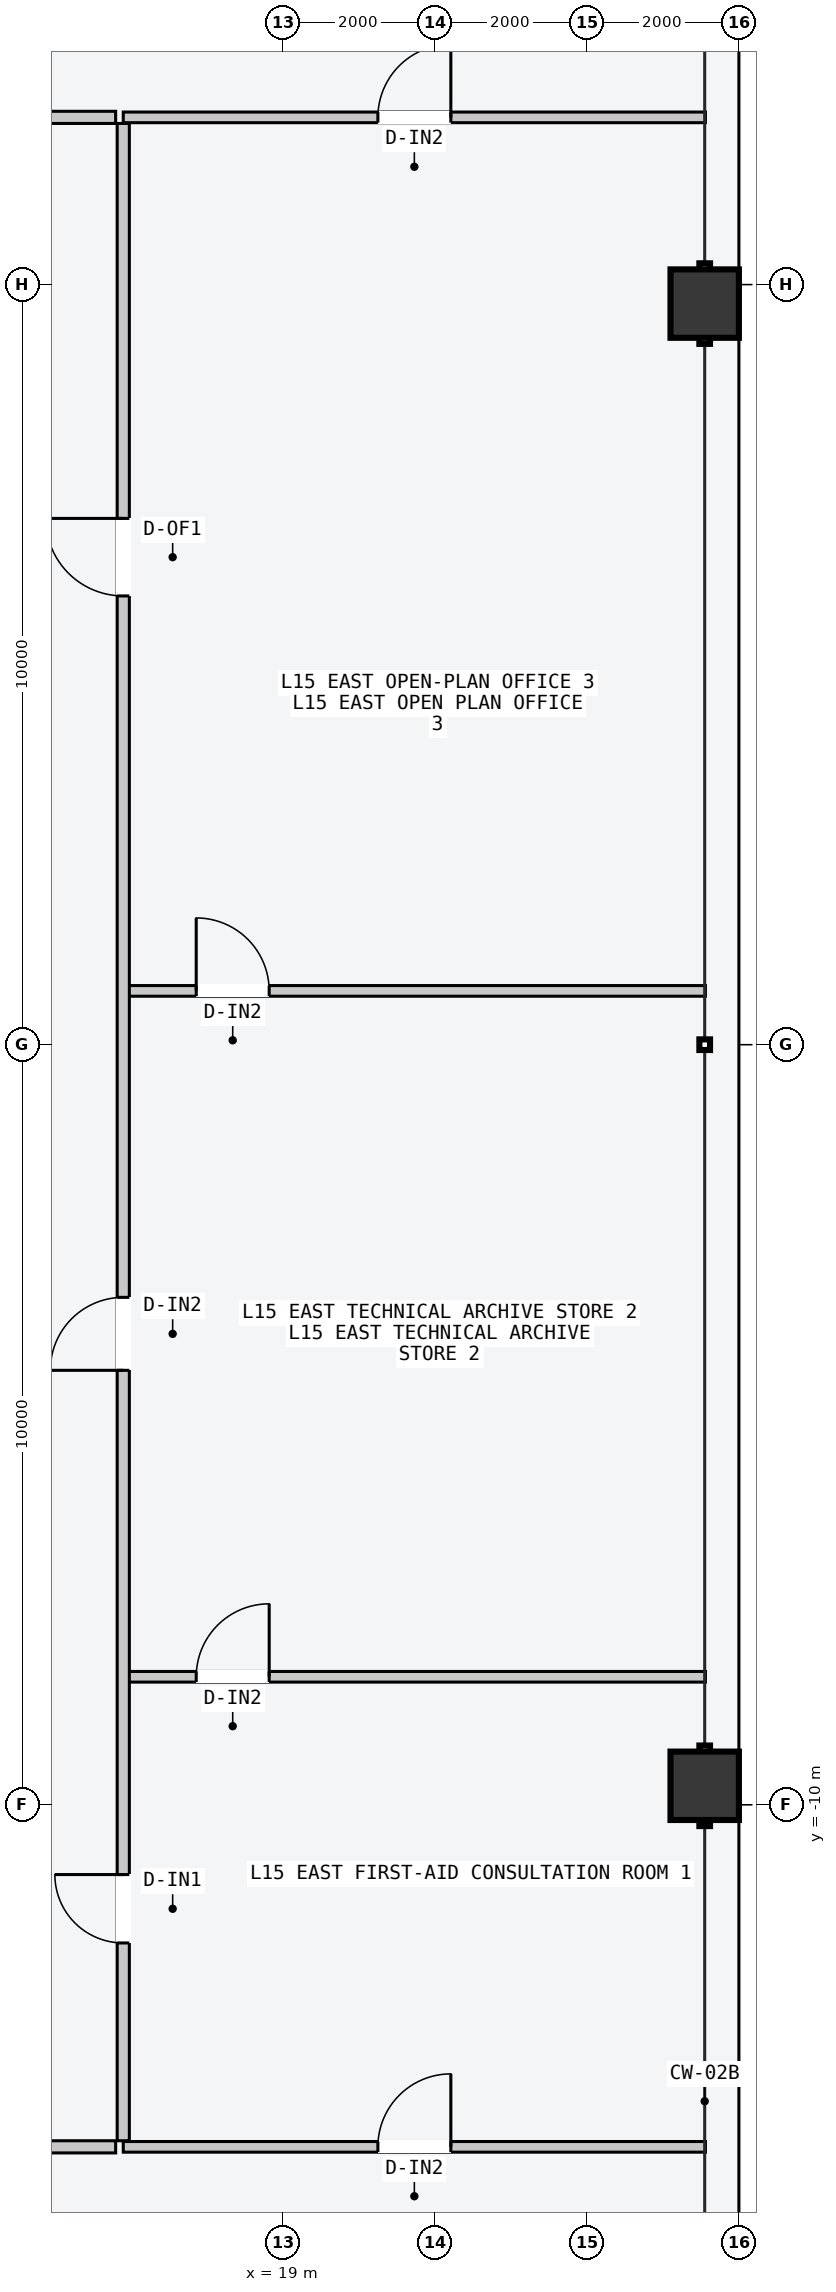
"""IFC4 building model, lengths in metres.
Left out: names, types, materials, properties, quantities, classifications, styles, units other than length and angle.
Written with IfcOpenShell. Run it as: python <this file> out.ifc"""

import sys

from ifc_helpers import new_model, si_unit, direction, frame, frame_2d, origin, origin_2d, place, context, subcontext, project, spatial, rectangle, hollow_rectangle, extrude, element, fill, save


model = new_model("IFC4")
c1 = context("Model", 3, precision=1e-05, world=origin(), true_north=direction((0.0, 1.0)))
c2 = subcontext(c1, "Body", "Model", "MODEL_VIEW")
j1 = project(units=[si_unit("LENGTHUNIT", "METRE"), si_unit("PLANEANGLEUNIT", "RADIAN")], contexts=[c1])
p1 = place(None, origin())
s1 = spatial("IfcSite", under=j1, at=p1, CompositionType="ELEMENT")
p2 = place(p1, origin())
s2 = spatial("IfcBuilding", under=s1, at=p2, CompositionType="ELEMENT")
p3 = place(p2, frame((0.0, 0.0, 60.0)))
s3 = spatial("IfcBuildingStorey", under=s2, at=p3, CompositionType="ELEMENT", Elevation=60.0)
for number, where, z_axis, x_axis in (
    (1, (24.55, -9.75, 0.0), (0.0, 0.0, 1.0), (0.0, 1.0, 0.0)),
    (2, (24.55, 9.75, 0.0), (0.0, 0.0, 1.0), (0.0, 1.0, 0.0)),
):
    element("IfcColumn", number, at=place(p3, frame(where, z_axis=z_axis, x_axis=x_axis)), inside=s3, PredefinedType="COLUMN", context=c2, shape_type="SweptSolid", body=[
        extrude(hollow_rectangle(XDim=0.9, YDim=0.9, WallThickness=0.045, at=origin_2d()), origin(), (0.0, 0.0, 1.0), 3.6),
    ])
p4 = place(p3, frame((-16.8, 12.2, 0.0), z_axis=(0.0, 0.0, 1.0), x_axis=(1.0, 0.0, 0.0)))
e3 = element("IfcWall", 3, at=p4, inside=s3, PredefinedType="PARTITIONING", context=c2, shape_type="SweptSolid", body=[
    extrude(rectangle(XDim=33.6, YDim=0.16, at=frame_2d((16.8, 0.0))), origin(), (0.0, 0.0, 1.0), 3.4),
])
p5 = place(p4, frame((16.1, 0.0, 0.0)))
e4 = element("IfcOpeningElement", 4, at=p5, cuts=e3, PredefinedType="OPENING", context=c2, shape_type="SweptSolid", body=[
    extrude(rectangle(XDim=1.4, YDim=2.2, at=frame_2d((0.7, 1.1))), frame((0.0, 0.09, 0.0), z_axis=(0.0, -1.0, 0.0), x_axis=(1.0, 0.0, 0.0)), (0.0, 0.0, 1.0), 0.18),
])
p6 = place(p3, frame((16.9, 12.2, 0.0), z_axis=(0.0, 0.0, 1.0), x_axis=(1.0, 0.0, 0.0)))
e5 = element("IfcWall", 5, at=p6, inside=s3, PredefinedType="PARTITIONING", context=c2, shape_type="SweptSolid", body=[
    extrude(rectangle(XDim=7.66, YDim=0.14, at=frame_2d((3.83, 0.0))), origin(), (0.0, 0.0, 1.0), 3.4),
])
p7 = place(p6, frame((3.35, 0.0, 0.0)))
e6 = element("IfcOpeningElement", 6, at=p7, cuts=e5, PredefinedType="OPENING", context=c2, shape_type="SweptSolid", body=[
    extrude(rectangle(XDim=0.96, YDim=2.18, at=frame_2d((0.48, 1.09))), frame((0.0, 0.08, 0.0), z_axis=(0.0, -1.0, 0.0), x_axis=(1.0, 0.0, 0.0)), (0.0, 0.0, 1.0), 0.16),
])
p8 = place(p3, frame((-16.8, -14.5, 0.0), z_axis=(0.0, 0.0, 1.0), x_axis=(1.0, 0.0, 0.0)))
e7 = element("IfcWall", 7, at=p8, inside=s3, PredefinedType="PARTITIONING", context=c2, shape_type="SweptSolid", body=[
    extrude(rectangle(XDim=33.6, YDim=0.16, at=frame_2d((16.8, 0.0))), origin(), (0.0, 0.0, 1.0), 3.4),
])
p9 = place(p8, frame((4.107, 0.0, 0.0)))
e8 = element("IfcOpeningElement", 8, at=p9, cuts=e7, PredefinedType="OPENING", context=c2, shape_type="SweptSolid", body=[
    extrude(rectangle(XDim=1.02, YDim=2.2, at=frame_2d((0.51, 1.1))), frame((0.0, 0.09, 0.0), z_axis=(0.0, -1.0, 0.0), x_axis=(1.0, 0.0, 0.0)), (0.0, 0.0, 1.0), 0.18),
])
p10 = place(p8, frame((13.881, 0.0, 0.0)))
e9 = element("IfcOpeningElement", 9, at=p10, cuts=e7, PredefinedType="OPENING", context=c2, shape_type="SweptSolid", body=[
    extrude(rectangle(XDim=1.06, YDim=2.2, at=frame_2d((0.53, 1.1))), frame((0.0, 0.09, 0.0), z_axis=(0.0, -1.0, 0.0), x_axis=(1.0, 0.0, 0.0)), (0.0, 0.0, 1.0), 0.18),
])
p11 = place(p8, frame((23.547, 0.0, 0.0)))
e10 = element("IfcOpeningElement", 10, at=p11, cuts=e7, PredefinedType="OPENING", context=c2, shape_type="SweptSolid", body=[
    extrude(rectangle(XDim=1.24, YDim=2.24, at=frame_2d((0.62, 1.12))), frame((0.0, 0.09, 0.0), z_axis=(0.0, -1.0, 0.0), x_axis=(1.0, 0.0, 0.0)), (0.0, 0.0, 1.0), 0.18),
])
p12 = place(p8, frame((30.473, 0.0, 0.0)))
e11 = element("IfcOpeningElement", 11, at=p12, cuts=e7, PredefinedType="OPENING", context=c2, shape_type="SweptSolid", body=[
    extrude(rectangle(XDim=1.4, YDim=2.2, at=frame_2d((0.7, 1.1))), frame((0.0, 0.09, 0.0), z_axis=(0.0, -1.0, 0.0), x_axis=(1.0, 0.0, 0.0)), (0.0, 0.0, 1.0), 0.18),
])
p13 = place(p3, frame((16.9, -14.5, 0.0), z_axis=(0.0, 0.0, 1.0), x_axis=(1.0, 0.0, 0.0)))
e12 = element("IfcWall", 12, at=p13, inside=s3, PredefinedType="PARTITIONING", context=c2, shape_type="SweptSolid", body=[
    extrude(rectangle(XDim=7.66, YDim=0.14, at=frame_2d((3.83, 0.0))), origin(), (0.0, 0.0, 1.0), 3.4),
])
p14 = place(p13, frame((3.35, 0.0, 0.0)))
e13 = element("IfcOpeningElement", 13, at=p14, cuts=e12, PredefinedType="OPENING", context=c2, shape_type="SweptSolid", body=[
    extrude(rectangle(XDim=0.96, YDim=2.18, at=frame_2d((0.48, 1.09))), frame((0.0, 0.08, 0.0), z_axis=(0.0, -1.0, 0.0), x_axis=(1.0, 0.0, 0.0)), (0.0, 0.0, 1.0), 0.16),
])
p15 = place(p3, frame((16.96, -8.316, 0.0), z_axis=(0.0, 0.0, 1.0), x_axis=(1.0, 0.0, 0.0)))
e14 = element("IfcWall", 14, at=p15, inside=s3, PredefinedType="PARTITIONING", context=c2, shape_type="SweptSolid", body=[
    extrude(rectangle(XDim=7.6, YDim=0.14, at=frame_2d((3.8, 0.0))), origin(), (0.0, 0.0, 1.0), 3.4),
])
p16 = place(p15, frame((0.9, 0.0, 0.0)))
e15 = element("IfcOpeningElement", 15, at=p16, cuts=e14, PredefinedType="OPENING", context=c2, shape_type="SweptSolid", body=[
    extrude(rectangle(XDim=0.96, YDim=2.18, at=frame_2d((0.48, 1.09))), frame((0.0, 0.08, 0.0), z_axis=(0.0, -1.0, 0.0), x_axis=(1.0, 0.0, 0.0)), (0.0, 0.0, 1.0), 0.16),
])
p17 = place(p3, frame((16.96, 0.708, 0.0), z_axis=(0.0, 0.0, 1.0), x_axis=(1.0, 0.0, 0.0)))
e16 = element("IfcWall", 16, at=p17, inside=s3, PredefinedType="PARTITIONING", context=c2, shape_type="SweptSolid", body=[
    extrude(rectangle(XDim=7.6, YDim=0.14, at=frame_2d((3.8, 0.0))), origin(), (0.0, 0.0, 1.0), 3.4),
])
p18 = place(p17, frame((0.9, 0.0, 0.0)))
e17 = element("IfcOpeningElement", 17, at=p18, cuts=e16, PredefinedType="OPENING", context=c2, shape_type="SweptSolid", body=[
    extrude(rectangle(XDim=0.96, YDim=2.18, at=frame_2d((0.48, 1.09))), frame((0.0, 0.08, 0.0), z_axis=(0.0, -1.0, 0.0), x_axis=(1.0, 0.0, 0.0)), (0.0, 0.0, 1.0), 0.16),
])
p19 = place(p3, frame((16.9, -14.42, 0.0), z_axis=(0.0, 0.0, 1.0), x_axis=(0.0, 1.0, 0.0)))
e18 = element("IfcWall", 18, at=p19, inside=s3, PredefinedType="PARTITIONING", context=c2, shape_type="SweptSolid", body=[
    extrude(rectangle(XDim=26.54, YDim=0.16, at=frame_2d((13.27, 0.0))), origin(), (0.0, 0.0, 1.0), 3.4),
])
p20 = place(p19, frame((2.602, 0.0, 0.0)))
e19 = element("IfcOpeningElement", 19, at=p20, cuts=e18, PredefinedType="OPENING", context=c2, shape_type="SweptSolid", body=[
    extrude(rectangle(XDim=0.9, YDim=2.15, at=frame_2d((0.45, 1.075))), frame((0.0, 0.09, 0.0), z_axis=(0.0, -1.0, 0.0), x_axis=(1.0, 0.0, 0.0)), (0.0, 0.0, 1.0), 0.18),
])
p21 = place(p19, frame((10.136, 0.0, 0.0)))
e20 = element("IfcOpeningElement", 20, at=p21, cuts=e18, PredefinedType="OPENING", context=c2, shape_type="SweptSolid", body=[
    extrude(rectangle(XDim=0.96, YDim=2.18, at=frame_2d((0.48, 1.09))), frame((0.0, 0.09, 0.0), z_axis=(0.0, -1.0, 0.0), x_axis=(1.0, 0.0, 0.0)), (0.0, 0.0, 1.0), 0.18),
])
p22 = place(p19, frame((20.324, 0.0, 0.0)))
e21 = element("IfcOpeningElement", 21, at=p22, cuts=e18, PredefinedType="OPENING", context=c2, shape_type="SweptSolid", body=[
    extrude(rectangle(XDim=1.02, YDim=2.2, at=frame_2d((0.51, 1.1))), frame((0.0, 0.09, 0.0), z_axis=(0.0, -1.0, 0.0), x_axis=(1.0, 0.0, 0.0)), (0.0, 0.0, 1.0), 0.18),
])
p23 = place(p7, origin())
e22 = element("IfcDoor", 22, at=p23, inside=s3, OperationType="SINGLE_SWING_RIGHT", PredefinedType="DOOR", context=c2, shape_type="SweptSolid", body=[
    extrude(rectangle(XDim=0.96, YDim=2.18, at=frame_2d((0.48, 1.09))), frame((0.0, 0.025, 0.0), z_axis=(0.0, -1.0, 0.0), x_axis=(1.0, 0.0, 0.0)), (0.0, 0.0, 1.0), 0.05),
])
fill(e6, e22)
p24 = place(p14, origin())
e23 = element("IfcDoor", 23, at=p24, inside=s3, OperationType="SINGLE_SWING_RIGHT", PredefinedType="DOOR", context=c2, shape_type="SweptSolid", body=[
    extrude(rectangle(XDim=0.96, YDim=2.18, at=frame_2d((0.48, 1.09))), frame((0.0, 0.025, 0.0), z_axis=(0.0, -1.0, 0.0), x_axis=(1.0, 0.0, 0.0)), (0.0, 0.0, 1.0), 0.05),
])
fill(e13, e23)
p25 = place(p16, origin())
e24 = element("IfcDoor", 24, at=p25, inside=s3, OperationType="SINGLE_SWING_RIGHT", PredefinedType="DOOR", context=c2, shape_type="SweptSolid", body=[
    extrude(rectangle(XDim=0.96, YDim=2.18, at=frame_2d((0.48, 1.09))), frame((0.0, 0.025, 0.0), z_axis=(0.0, -1.0, 0.0), x_axis=(1.0, 0.0, 0.0)), (0.0, 0.0, 1.0), 0.05),
])
fill(e15, e24)
p26 = place(p18, origin())
e25 = element("IfcDoor", 25, at=p26, inside=s3, OperationType="SINGLE_SWING_LEFT", PredefinedType="DOOR", context=c2, shape_type="SweptSolid", body=[
    extrude(rectangle(XDim=0.96, YDim=2.18, at=frame_2d((0.48, 1.09))), frame((0.0, 0.025, 0.0), z_axis=(0.0, -1.0, 0.0), x_axis=(1.0, 0.0, 0.0)), (0.0, 0.0, 1.0), 0.05),
])
fill(e17, e25)
p27 = place(p20, origin())
e26 = element("IfcDoor", 26, at=p27, inside=s3, OperationType="SINGLE_SWING_RIGHT", PredefinedType="DOOR", context=c2, shape_type="SweptSolid", body=[
    extrude(rectangle(XDim=0.9, YDim=2.15, at=frame_2d((0.45, 1.075))), frame((0.0, 0.025, 0.0), z_axis=(0.0, -1.0, 0.0), x_axis=(1.0, 0.0, 0.0)), (0.0, 0.0, 1.0), 0.05),
])
fill(e19, e26)
p28 = place(p21, origin())
e27 = element("IfcDoor", 27, at=p28, inside=s3, OperationType="SINGLE_SWING_LEFT", PredefinedType="DOOR", context=c2, shape_type="SweptSolid", body=[
    extrude(rectangle(XDim=0.96, YDim=2.18, at=frame_2d((0.48, 1.09))), frame((0.0, 0.025, 0.0), z_axis=(0.0, -1.0, 0.0), x_axis=(1.0, 0.0, 0.0)), (0.0, 0.0, 1.0), 0.05),
])
fill(e20, e27)
p29 = place(p22, origin())
e28 = element("IfcDoor", 28, at=p29, inside=s3, OperationType="SINGLE_SWING_RIGHT", PredefinedType="DOOR", context=c2, shape_type="SweptSolid", body=[
    extrude(rectangle(XDim=1.02, YDim=2.2, at=frame_2d((0.51, 1.1))), frame((0.0, 0.025, 0.0), z_axis=(0.0, -1.0, 0.0), x_axis=(1.0, 0.0, 0.0)), (0.0, 0.0, 1.0), 0.05),
])
fill(e21, e28)
save(model, sys.argv[1])
